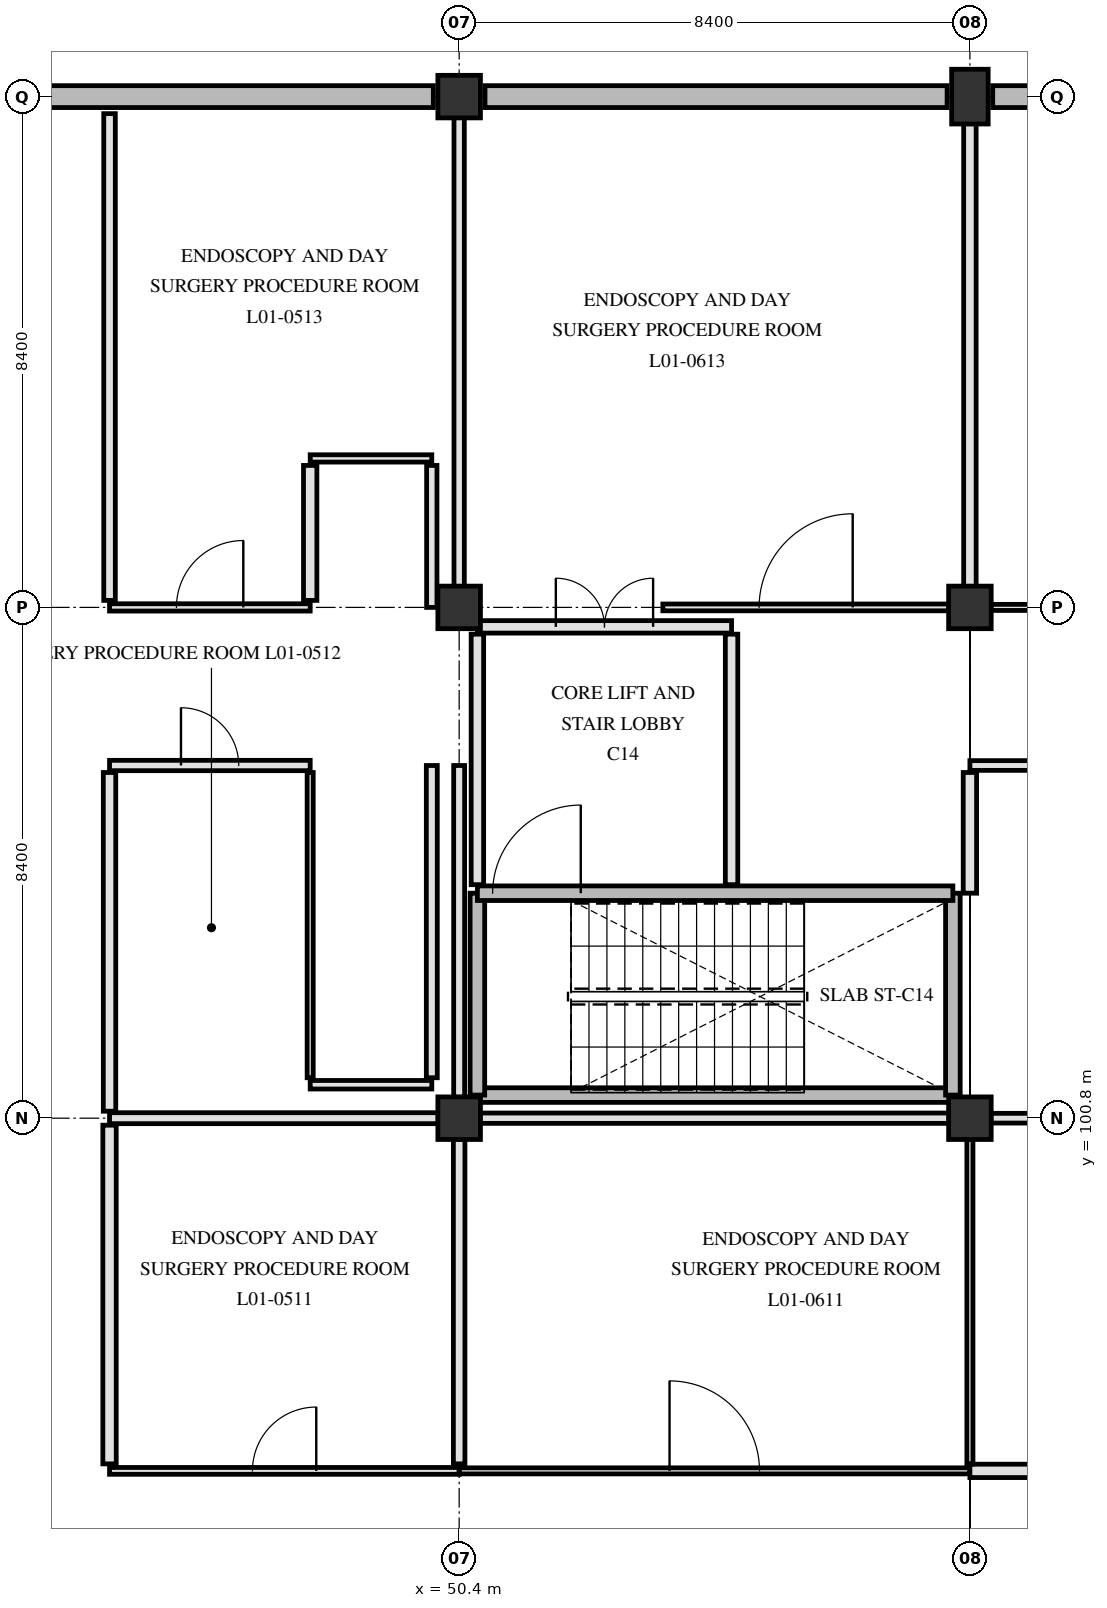
"""IFC4 building model, lengths in metres.
Left out: names, types, materials, properties, quantities, classifications, styles, units other than length and angle.
Written with IfcOpenShell. Run it as: python <this file> out.ifc"""

import sys

from ifc_helpers import new_model, si_unit, direction, frame, frame_2d, origin, origin_2d, place, context, subcontext, project, spatial, rectangle, extrude, element, fill, save


model = new_model("IFC4")
c1 = context("Model", 3, precision=1e-05, world=origin(), true_north=direction((0.0, 1.0)))
c2 = subcontext(c1, "Body", "Model", "MODEL_VIEW")
j1 = project(units=[si_unit("LENGTHUNIT", "METRE"), si_unit("PLANEANGLEUNIT", "RADIAN")], contexts=[c1])
p1 = place(None, origin())
s1 = spatial("IfcSite", under=j1, at=p1, CompositionType="ELEMENT")
p2 = place(p1, origin())
s2 = spatial("IfcBuilding", under=s1, at=p2, CompositionType="ELEMENT")
p3 = place(p2, frame((0.0, 0.0, 4.8)))
s3 = spatial("IfcBuildingStorey", under=s2, at=p3, CompositionType="ELEMENT", Elevation=4.8)
for number, where, z_axis, x_axis in (
    (1, (50.4, 100.8, 0.0), (0.0, 0.0, 1.0), (1.0, 0.0, 0.0)),
    (2, (50.4, 109.2, 0.0), (0.0, 0.0, 1.0), (1.0, 0.0, 0.0)),
    (3, (50.4, 117.6, 0.0), (0.0, 0.0, 1.0), (1.0, 0.0, 0.0)),
    (4, (58.8, 100.8, 0.0), (0.0, 0.0, 1.0), (1.0, 0.0, 0.0)),
    (5, (58.8, 109.2, 0.0), (0.0, 0.0, 1.0), (1.0, 0.0, 0.0)),
):
    element("IfcColumn", number, at=place(p3, frame(where, z_axis=z_axis, x_axis=x_axis)), inside=s3, PredefinedType="COLUMN", context=c2, shape_type="SweptSolid", body=[
        extrude(rectangle(XDim=0.7, YDim=0.7, at=origin_2d()), origin(), (0.0, 0.0, 1.0), 4.5),
    ])
p4 = place(p3, frame((58.8, 117.6, 0.0), z_axis=(0.0, 0.0, 1.0), x_axis=(1.0, 0.0, 0.0)))
e6 = element("IfcColumn", 6, at=p4, inside=s3, PredefinedType="PILASTER", context=c2, shape_type="SweptSolid", body=[
    extrude(rectangle(XDim=0.6, YDim=0.9, at=origin_2d()), origin(), (0.0, 0.0, 1.0), 4.5),
])
for number, where, z_axis, x_axis in (
    (7, (42.375, 117.6, 0.0), (0.0, 0.0, 1.0), (1.0, 0.0, 0.0)),
    (8, (50.825, 117.6, 0.0), (0.0, 0.0, 1.0), (1.0, 0.0, 0.0)),
):
    element("IfcWall", number, at=place(p3, frame(where, z_axis=z_axis, x_axis=x_axis)), inside=s3, PredefinedType="SOLIDWALL", context=c2, shape_type="SweptSolid", body=[
        extrude(rectangle(XDim=7.6, YDim=0.36, at=frame_2d((3.8, 0.0))), origin(), (0.0, 0.0, 1.0), 4.15),
    ])
p5 = place(p3, frame((59.175, 117.6, 0.0), z_axis=(0.0, 0.0, 1.0), x_axis=(1.0, 0.0, 0.0)))
e9 = element("IfcWall", 9, at=p5, inside=s3, PredefinedType="SOLIDWALL", context=c2, shape_type="SweptSolid", body=[
    extrude(rectangle(XDim=7.55, YDim=0.36, at=frame_2d((3.775, 0.0))), origin(), (0.0, 0.0, 1.0), 4.15),
])
p6 = place(p3, frame((50.7, 101.18, 0.0), z_axis=(0.0, 0.0, 1.0), x_axis=(1.0, 0.0, 0.0)))
e10 = element("IfcWall", 10, at=p6, inside=s3, PredefinedType="SHEAR", context=c2, shape_type="SweptSolid", body=[
    extrude(rectangle(XDim=7.82, YDim=0.24, at=frame_2d((3.91, 0.0))), origin(), (0.0, 0.0, 1.0), 4.15),
])
for number, where, z_axis, x_axis in (
    (11, (50.7, 101.18, 0.0), (0.0, 0.0, 1.0), (0.0, 1.0, 0.0)),
    (12, (58.52, 101.18, 0.0), (0.0, 0.0, 1.0), (0.0, 1.0, 0.0)),
):
    element("IfcWall", number, at=place(p3, frame(where, z_axis=z_axis, x_axis=x_axis)), inside=s3, PredefinedType="SHEAR", context=c2, shape_type="SweptSolid", body=[
        extrude(rectangle(XDim=3.32, YDim=0.24, at=frame_2d((1.66, 0.0))), origin(), (0.0, 0.0, 1.0), 4.15),
    ])
p7 = place(p3, frame((50.7, 104.5, 0.0), z_axis=(0.0, 0.0, 1.0), x_axis=(1.0, 0.0, 0.0)))
e13 = element("IfcWall", 13, at=p7, inside=s3, PredefinedType="SHEAR", context=c2, shape_type="SweptSolid", body=[
    extrude(rectangle(XDim=7.82, YDim=0.24, at=frame_2d((3.91, 0.0))), origin(), (0.0, 0.0, 1.0), 4.15),
])
p8 = place(p7, frame((0.25, 0.0, 0.0)))
e14 = element("IfcOpeningElement", 14, at=p8, cuts=e13, PredefinedType="OPENING", context=c2, shape_type="SweptSolid", body=[
    extrude(rectangle(XDim=1.45, YDim=2.2, at=frame_2d((0.725, 1.1))), frame((0.0, 0.13, 0.0), z_axis=(0.0, -1.0, 0.0), x_axis=(1.0, 0.0, 0.0)), (0.0, 0.0, 1.0), 0.26),
])
p9 = place(p3, frame((54.88, 104.64, 0.0), z_axis=(0.0, 0.0, 1.0), x_axis=(0.0, 1.0, 0.0)))
e15 = element("IfcWall", 15, at=p9, inside=s3, PredefinedType="PARTITIONING", context=c2, shape_type="SweptSolid", body=[
    extrude(rectangle(XDim=4.12, YDim=0.205, at=frame_2d((2.06, 0.0))), origin(), (0.0, 0.0, 1.0), 4.14),
])
p10 = place(p3, frame((50.7, 104.64, 0.0), z_axis=(0.0, 0.0, 1.0), x_axis=(0.0, 1.0, 0.0)))
e16 = element("IfcWall", 16, at=p10, inside=s3, PredefinedType="PARTITIONING", context=c2, shape_type="SweptSolid", body=[
    extrude(rectangle(XDim=4.12, YDim=0.205, at=frame_2d((2.06, 0.0))), origin(), (0.0, 0.0, 1.0), 3.59),
])
p11 = place(p3, frame((50.7, 108.88, 0.0), z_axis=(0.0, 0.0, 1.0), x_axis=(1.0, 0.0, 0.0)))
e17 = element("IfcWall", 17, at=p11, inside=s3, PredefinedType="PARTITIONING", context=c2, shape_type="SweptSolid", body=[
    extrude(rectangle(XDim=4.18, YDim=0.205, at=frame_2d((2.09, 0.0))), origin(), (0.0, 0.0, 1.0), 3.54),
])
p12 = place(p11, frame((1.29, 0.0, 0.0)))
e18 = element("IfcOpeningElement", 18, at=p12, cuts=e17, PredefinedType="OPENING", context=c2, shape_type="SweptSolid", body=[
    extrude(rectangle(XDim=1.6, YDim=2.25, at=frame_2d((0.8, 1.125))), frame((0.0, 0.113, 0.0), z_axis=(0.0, -1.0, 0.0), x_axis=(1.0, 0.0, 0.0)), (0.0, 0.0, 1.0), 0.225),
])
p13 = place(p3, frame((44.65, 95.0, 0.0), z_axis=(0.0, 0.0, 1.0), x_axis=(1.0, 0.0, 0.0)))
e19 = element("IfcWall", 19, at=p13, inside=s3, PredefinedType="PARTITIONING", context=c2, shape_type="SweptSolid", body=[
    extrude(rectangle(XDim=5.75, YDim=0.112, at=frame_2d((2.875, 0.0))), origin(), (0.0, 0.0, 1.0), 3.59),
])
p14 = place(p13, frame((2.35, 0.0, 0.0)))
e20 = element("IfcOpeningElement", 20, at=p14, cuts=e19, PredefinedType="OPENING", context=c2, shape_type="SweptSolid", body=[
    extrude(rectangle(XDim=1.05, YDim=2.15, at=frame_2d((0.525, 1.075))), frame((0.0, 0.066, 0.0), z_axis=(0.0, -1.0, 0.0), x_axis=(1.0, 0.0, 0.0)), (0.0, 0.0, 1.0), 0.132),
])
p15 = place(p3, frame((50.4, 95.0, 0.0), z_axis=(0.0, 0.0, 1.0), x_axis=(1.0, 0.0, 0.0)))
e21 = element("IfcWall", 21, at=p15, inside=s3, PredefinedType="PARTITIONING", context=c2, shape_type="SweptSolid", body=[
    extrude(rectangle(XDim=8.4, YDim=0.1, at=frame_2d((4.2, 0.0))), origin(), (0.0, 0.0, 1.0), 3.59),
])
p16 = place(p15, frame((3.46, 0.0, 0.0)))
e22 = element("IfcOpeningElement", 22, at=p16, cuts=e21, PredefinedType="OPENING", context=c2, shape_type="SweptSolid", body=[
    extrude(rectangle(XDim=1.48, YDim=2.22, at=frame_2d((0.74, 1.11))), frame((0.0, 0.06, 0.0), z_axis=(0.0, -1.0, 0.0), x_axis=(1.0, 0.0, 0.0)), (0.0, 0.0, 1.0), 0.12),
])
p17 = place(p3, frame((58.8, 95.0, 0.0), z_axis=(0.0, 0.0, 1.0), x_axis=(1.0, 0.0, 0.0)))
e23 = element("IfcWall", 23, at=p17, inside=s3, PredefinedType="PARTITIONING", context=c2, shape_type="SweptSolid", body=[
    extrude(rectangle(XDim=8.4, YDim=0.22, at=frame_2d((4.2, 0.0))), origin(), (0.0, 0.0, 1.0), 3.59),
])
p18 = place(p17, frame((3.69, 0.0, 0.0)))
e24 = element("IfcOpeningElement", 24, at=p18, cuts=e23, PredefinedType="OPENING", context=c2, shape_type="SweptSolid", body=[
    extrude(rectangle(XDim=1.02, YDim=2.12, at=frame_2d((0.51, 1.06))), frame((0.0, 0.12, 0.0), z_axis=(0.0, -1.0, 0.0), x_axis=(1.0, 0.0, 0.0)), (0.0, 0.0, 1.0), 0.24),
])
p19 = place(p3, frame((44.65, 100.8, 0.0), z_axis=(0.0, 0.0, 1.0), x_axis=(1.0, 0.0, 0.0)))
e25 = element("IfcWall", 25, at=p19, inside=s3, PredefinedType="PARTITIONING", context=c2, shape_type="SweptSolid", body=[
    extrude(rectangle(XDim=5.405, YDim=0.18, at=frame_2d((2.703, 0.0))), origin(), (0.0, 0.0, 1.0), 3.54),
])
p20 = place(p3, frame((50.745, 100.8, 0.0), z_axis=(0.0, 0.0, 1.0), x_axis=(1.0, 0.0, 0.0)))
e26 = element("IfcWall", 26, at=p20, inside=s3, PredefinedType="PARTITIONING", context=c2, shape_type="SweptSolid", body=[
    extrude(rectangle(XDim=7.71, YDim=0.17, at=frame_2d((3.855, 0.0))), origin(), (0.0, 0.0, 1.0), 3.54),
])
p21 = place(p3, frame((59.145, 100.8, 0.0), z_axis=(0.0, 0.0, 1.0), x_axis=(1.0, 0.0, 0.0)))
e27 = element("IfcWall", 27, at=p21, inside=s3, PredefinedType="PARTITIONING", context=c2, shape_type="SweptSolid", body=[
    extrude(rectangle(XDim=7.66, YDim=0.16, at=frame_2d((3.83, 0.0))), origin(), (0.0, 0.0, 1.0), 3.54),
])
p22 = place(p3, frame((47.95, 101.35, 0.0), z_axis=(0.0, 0.0, 1.0), x_axis=(1.0, 0.0, 0.0)))
e28 = element("IfcWall", 28, at=p22, inside=s3, PredefinedType="PARTITIONING", context=c2, shape_type="SweptSolid", body=[
    extrude(rectangle(XDim=2.0, YDim=0.14, at=frame_2d((1.0, 0.0))), origin(), (0.0, 0.0, 1.0), 4.14),
])
p23 = place(p3, frame((44.65, 106.6, 0.0), z_axis=(0.0, 0.0, 1.0), x_axis=(1.0, 0.0, 0.0)))
e29 = element("IfcWall", 29, at=p23, inside=s3, PredefinedType="PARTITIONING", context=c2, shape_type="SweptSolid", body=[
    extrude(rectangle(XDim=3.3, YDim=0.17, at=frame_2d((1.65, 0.0))), origin(), (0.0, 0.0, 1.0), 4.14),
])
p24 = place(p23, frame((1.175, 0.0, 0.0)))
e30 = element("IfcOpeningElement", 30, at=p24, cuts=e29, PredefinedType="OPENING", context=c2, shape_type="SweptSolid", body=[
    extrude(rectangle(XDim=0.95, YDim=2.1, at=frame_2d((0.475, 1.05))), frame((0.0, 0.095, 0.0), z_axis=(0.0, -1.0, 0.0), x_axis=(1.0, 0.0, 0.0)), (0.0, 0.0, 1.0), 0.19),
])
p25 = place(p3, frame((58.8, 106.6, 0.0), z_axis=(0.0, 0.0, 1.0), x_axis=(1.0, 0.0, 0.0)))
e31 = element("IfcWall", 31, at=p25, inside=s3, PredefinedType="PARTITIONING", context=c2, shape_type="SweptSolid", body=[
    extrude(rectangle(XDim=8.4, YDim=0.16, at=frame_2d((4.2, 0.0))), origin(), (0.0, 0.0, 1.0), 3.59),
])
p26 = place(p25, frame((3.66, 0.0, 0.0)))
e32 = element("IfcOpeningElement", 32, at=p26, cuts=e31, PredefinedType="OPENING", context=c2, shape_type="SweptSolid", body=[
    extrude(rectangle(XDim=1.08, YDim=2.12, at=frame_2d((0.54, 1.06))), frame((0.0, 0.09, 0.0), z_axis=(0.0, -1.0, 0.0), x_axis=(1.0, 0.0, 0.0)), (0.0, 0.0, 1.0), 0.18),
])
p27 = place(p3, frame((44.65, 109.2, 0.0), z_axis=(0.0, 0.0, 1.0), x_axis=(1.0, 0.0, 0.0)))
e33 = element("IfcWall", 33, at=p27, inside=s3, PredefinedType="PARTITIONING", context=c2, shape_type="SweptSolid", body=[
    extrude(rectangle(XDim=3.3, YDim=0.12, at=frame_2d((1.65, 0.0))), origin(), (0.0, 0.0, 1.0), 3.54),
])
p28 = place(p27, frame((1.1, 0.0, 0.0)))
e34 = element("IfcOpeningElement", 34, at=p28, cuts=e33, PredefinedType="OPENING", context=c2, shape_type="SweptSolid", body=[
    extrude(rectangle(XDim=1.1, YDim=2.15, at=frame_2d((0.55, 1.075))), frame((0.0, 0.07, 0.0), z_axis=(0.0, -1.0, 0.0), x_axis=(1.0, 0.0, 0.0)), (0.0, 0.0, 1.0), 0.14),
])
p29 = place(p3, frame((53.75, 109.2, 0.0), z_axis=(0.0, 0.0, 1.0), x_axis=(1.0, 0.0, 0.0)))
e35 = element("IfcWall", 35, at=p29, inside=s3, PredefinedType="PARTITIONING", context=c2, shape_type="SweptSolid", body=[
    extrude(rectangle(XDim=4.705, YDim=0.112, at=frame_2d((2.353, 0.0))), origin(), (0.0, 0.0, 1.0), 3.54),
])
p30 = place(p29, frame((1.583, 0.0, 0.0)))
e36 = element("IfcOpeningElement", 36, at=p30, cuts=e35, PredefinedType="OPENING", context=c2, shape_type="SweptSolid", body=[
    extrude(rectangle(XDim=1.54, YDim=2.24, at=frame_2d((0.77, 1.12))), frame((0.0, 0.066, 0.0), z_axis=(0.0, -1.0, 0.0), x_axis=(1.0, 0.0, 0.0)), (0.0, 0.0, 1.0), 0.132),
])
p31 = place(p3, frame((59.145, 109.2, 0.0), z_axis=(0.0, 0.0, 1.0), x_axis=(1.0, 0.0, 0.0)))
e37 = element("IfcWall", 37, at=p31, inside=s3, PredefinedType="PARTITIONING", context=c2, shape_type="SweptSolid", body=[
    extrude(rectangle(XDim=7.66, YDim=0.1, at=frame_2d((3.83, 0.0))), origin(), (0.0, 0.0, 1.0), 3.54),
])
p32 = place(p31, frame((3.22, 0.0, 0.0)))
e38 = element("IfcOpeningElement", 38, at=p32, cuts=e37, PredefinedType="OPENING", context=c2, shape_type="SweptSolid", body=[
    extrude(rectangle(XDim=1.22, YDim=2.18, at=frame_2d((0.61, 1.09))), frame((0.0, 0.06, 0.0), z_axis=(0.0, -1.0, 0.0), x_axis=(1.0, 0.0, 0.0)), (0.0, 0.0, 1.0), 0.12),
])
p33 = place(p3, frame((47.95, 111.65, 0.0), z_axis=(0.0, 0.0, 1.0), x_axis=(1.0, 0.0, 0.0)))
e39 = element("IfcWall", 39, at=p33, inside=s3, PredefinedType="PARTITIONING", context=c2, shape_type="SweptSolid", body=[
    extrude(rectangle(XDim=2.0, YDim=0.12, at=frame_2d((1.0, 0.0))), origin(), (0.0, 0.0, 1.0), 4.14),
])
p34 = place(p3, frame((44.65, 95.115, 0.0), z_axis=(0.0, 0.0, 1.0), x_axis=(0.0, 1.0, 0.0)))
e40 = element("IfcWall", 40, at=p34, inside=s3, PredefinedType="PARTITIONING", context=c2, shape_type="SweptSolid", body=[
    extrude(rectangle(XDim=5.57, YDim=0.22, at=frame_2d((2.785, 0.0))), origin(), (0.0, 0.0, 1.0), 3.54),
])
p35 = place(p3, frame((44.65, 100.915, 0.0), z_axis=(0.0, 0.0, 1.0), x_axis=(0.0, 1.0, 0.0)))
e41 = element("IfcWall", 41, at=p35, inside=s3, PredefinedType="PARTITIONING", context=c2, shape_type="SweptSolid", body=[
    extrude(rectangle(XDim=5.57, YDim=0.205, at=frame_2d((2.785, 0.0))), origin(), (0.0, 0.0, 1.0), 3.54),
])
p36 = place(p3, frame((44.65, 109.315, 0.0), z_axis=(0.0, 0.0, 1.0), x_axis=(0.0, 1.0, 0.0)))
e42 = element("IfcWall", 42, at=p36, inside=s3, PredefinedType="PARTITIONING", context=c2, shape_type="SweptSolid", body=[
    extrude(rectangle(XDim=8.005, YDim=0.19, at=frame_2d((4.002, 0.0))), origin(), (0.0, 0.0, 1.0), 3.54),
])
p37 = place(p3, frame((47.95, 101.465, 0.0), z_axis=(0.0, 0.0, 1.0), x_axis=(0.0, 1.0, 0.0)))
e43 = element("IfcWall", 43, at=p37, inside=s3, PredefinedType="PARTITIONING", context=c2, shape_type="SweptSolid", body=[
    extrude(rectangle(XDim=5.02, YDim=0.1, at=frame_2d((2.51, 0.0))), origin(), (0.0, 0.0, 1.0), 4.14),
])
p38 = place(p3, frame((47.95, 109.315, 0.0), z_axis=(0.0, 0.0, 1.0), x_axis=(0.0, 1.0, 0.0)))
e44 = element("IfcWall", 44, at=p38, inside=s3, PredefinedType="PARTITIONING", context=c2, shape_type="SweptSolid", body=[
    extrude(rectangle(XDim=2.22, YDim=0.22, at=frame_2d((1.11, 0.0))), origin(), (0.0, 0.0, 1.0), 3.54),
])
p39 = place(p3, frame((49.95, 101.465, 0.0), z_axis=(0.0, 0.0, 1.0), x_axis=(0.0, 1.0, 0.0)))
e45 = element("IfcWall", 45, at=p39, inside=s3, PredefinedType="PARTITIONING", context=c2, shape_type="SweptSolid", body=[
    extrude(rectangle(XDim=5.135, YDim=0.18, at=frame_2d((2.567, 0.0))), origin(), (0.0, 0.0, 1.0), 4.14),
])
p40 = place(p3, frame((49.95, 109.2, 0.0), z_axis=(0.0, 0.0, 1.0), x_axis=(0.0, 1.0, 0.0)))
e46 = element("IfcWall", 46, at=p40, inside=s3, PredefinedType="PARTITIONING", context=c2, shape_type="SweptSolid", body=[
    extrude(rectangle(XDim=2.335, YDim=0.17, at=frame_2d((1.167, 0.0))), origin(), (0.0, 0.0, 1.0), 3.54),
])
p41 = place(p3, frame((50.4, 95.115, 0.0), z_axis=(0.0, 0.0, 1.0), x_axis=(0.0, 1.0, 0.0)))
e47 = element("IfcWall", 47, at=p41, inside=s3, PredefinedType="PARTITIONING", context=c2, shape_type="SweptSolid", body=[
    extrude(rectangle(XDim=5.34, YDim=0.19, at=frame_2d((2.67, 0.0))), origin(), (0.0, 0.0, 1.0), 3.59),
])
p42 = place(p3, frame((50.4, 101.145, 0.0), z_axis=(0.0, 0.0, 1.0), x_axis=(0.0, 1.0, 0.0)))
e48 = element("IfcWall", 48, at=p42, inside=s3, PredefinedType="PARTITIONING", context=c2, shape_type="SweptSolid", body=[
    extrude(rectangle(XDim=5.455, YDim=0.18, at=frame_2d((2.728, 0.0))), origin(), (0.0, 0.0, 1.0), 3.59),
])
p43 = place(p3, frame((50.4, 109.545, 0.0), z_axis=(0.0, 0.0, 1.0), x_axis=(0.0, 1.0, 0.0)))
e49 = element("IfcWall", 49, at=p43, inside=s3, PredefinedType="PARTITIONING", context=c2, shape_type="SweptSolid", body=[
    extrude(rectangle(XDim=7.71, YDim=0.17, at=frame_2d((3.855, 0.0))), origin(), (0.0, 0.0, 1.0), 3.59),
])
p44 = place(p3, frame((58.8, 95.115, 0.0), z_axis=(0.0, 0.0, 1.0), x_axis=(0.0, 1.0, 0.0)))
e50 = element("IfcWall", 50, at=p44, inside=s3, PredefinedType="PARTITIONING", context=c2, shape_type="SweptSolid", body=[
    extrude(rectangle(XDim=5.34, YDim=0.1, at=frame_2d((2.67, 0.0))), origin(), (0.0, 0.0, 1.0), 3.59),
])
p45 = place(p3, frame((58.8, 104.5, 0.0), z_axis=(0.0, 0.0, 1.0), x_axis=(0.0, 1.0, 0.0)))
e51 = element("IfcWall", 51, at=p45, inside=s3, PredefinedType="PARTITIONING", context=c2, shape_type="SweptSolid", body=[
    extrude(rectangle(XDim=1.985, YDim=0.22, at=frame_2d((0.993, 0.0))), origin(), (0.0, 0.0, 1.0), 3.59),
])
p46 = place(p3, frame((58.8, 109.545, 0.0), z_axis=(0.0, 0.0, 1.0), x_axis=(0.0, 1.0, 0.0)))
e52 = element("IfcWall", 52, at=p46, inside=s3, PredefinedType="PARTITIONING", context=c2, shape_type="SweptSolid", body=[
    extrude(rectangle(XDim=7.61, YDim=0.205, at=frame_2d((3.805, 0.0))), origin(), (0.0, 0.0, 1.0), 3.59),
])
p47 = place(p8, origin())
e53 = element("IfcDoor", 53, at=p47, inside=s3, OperationType="SINGLE_SWING_RIGHT", PredefinedType="DOOR", context=c2, shape_type="SweptSolid", body=[
    extrude(rectangle(XDim=1.45, YDim=2.2, at=frame_2d((0.725, 1.1))), frame((0.0, 0.025, 0.0), z_axis=(0.0, -1.0, 0.0), x_axis=(1.0, 0.0, 0.0)), (0.0, 0.0, 1.0), 0.05),
])
fill(e14, e53)
p48 = place(p12, origin())
e54 = element("IfcDoor", 54, at=p48, inside=s3, OperationType="DOUBLE_SWING_LEFT", PredefinedType="DOOR", context=c2, shape_type="SweptSolid", body=[
    extrude(rectangle(XDim=1.6, YDim=2.25, at=frame_2d((0.8, 1.125))), frame((0.0, 0.025, 0.0), z_axis=(0.0, -1.0, 0.0), x_axis=(1.0, 0.0, 0.0)), (0.0, 0.0, 1.0), 0.05),
])
fill(e18, e54)
p49 = place(p14, origin())
e55 = element("IfcDoor", 55, at=p49, inside=s3, OperationType="SINGLE_SWING_RIGHT", PredefinedType="DOOR", context=c2, shape_type="SweptSolid", body=[
    extrude(rectangle(XDim=1.05, YDim=2.15, at=frame_2d((0.525, 1.075))), frame((0.0, 0.025, 0.0), z_axis=(0.0, -1.0, 0.0), x_axis=(1.0, 0.0, 0.0)), (0.0, 0.0, 1.0), 0.05),
])
fill(e20, e55)
p50 = place(p24, origin())
e56 = element("IfcDoor", 56, at=p50, inside=s3, OperationType="SINGLE_SWING_LEFT", PredefinedType="DOOR", context=c2, shape_type="SweptSolid", body=[
    extrude(rectangle(XDim=0.95, YDim=2.1, at=frame_2d((0.475, 1.05))), frame((0.0, 0.025, 0.0), z_axis=(0.0, -1.0, 0.0), x_axis=(1.0, 0.0, 0.0)), (0.0, 0.0, 1.0), 0.05),
])
fill(e30, e56)
p51 = place(p28, origin())
e57 = element("IfcDoor", 57, at=p51, inside=s3, OperationType="SINGLE_SWING_RIGHT", PredefinedType="DOOR", context=c2, shape_type="SweptSolid", body=[
    extrude(rectangle(XDim=1.1, YDim=2.15, at=frame_2d((0.55, 1.075))), frame((0.0, 0.025, 0.0), z_axis=(0.0, -1.0, 0.0), x_axis=(1.0, 0.0, 0.0)), (0.0, 0.0, 1.0), 0.05),
])
fill(e34, e57)
p52 = place(p16, origin())
e58 = element("IfcDoor", 58, at=p52, inside=s3, OperationType="SINGLE_SWING_LEFT", PredefinedType="DOOR", context=c2, shape_type="SweptSolid", body=[
    extrude(rectangle(XDim=1.48, YDim=2.22, at=frame_2d((0.74, 1.11))), frame((0.0, 0.025, 0.0), z_axis=(0.0, -1.0, 0.0), x_axis=(1.0, 0.0, 0.0)), (0.0, 0.0, 1.0), 0.05),
])
fill(e22, e58)
p53 = place(p30, origin())
e59 = element("IfcDoor", 59, at=p53, inside=s3, OperationType="SINGLE_SWING_RIGHT", PredefinedType="DOOR", context=c2, shape_type="SweptSolid", body=[
    extrude(rectangle(XDim=1.54, YDim=2.24, at=frame_2d((0.77, 1.12))), frame((0.0, 0.025, 0.0), z_axis=(0.0, -1.0, 0.0), x_axis=(1.0, 0.0, 0.0)), (0.0, 0.0, 1.0), 0.05),
])
fill(e36, e59)
save(model, sys.argv[1])
